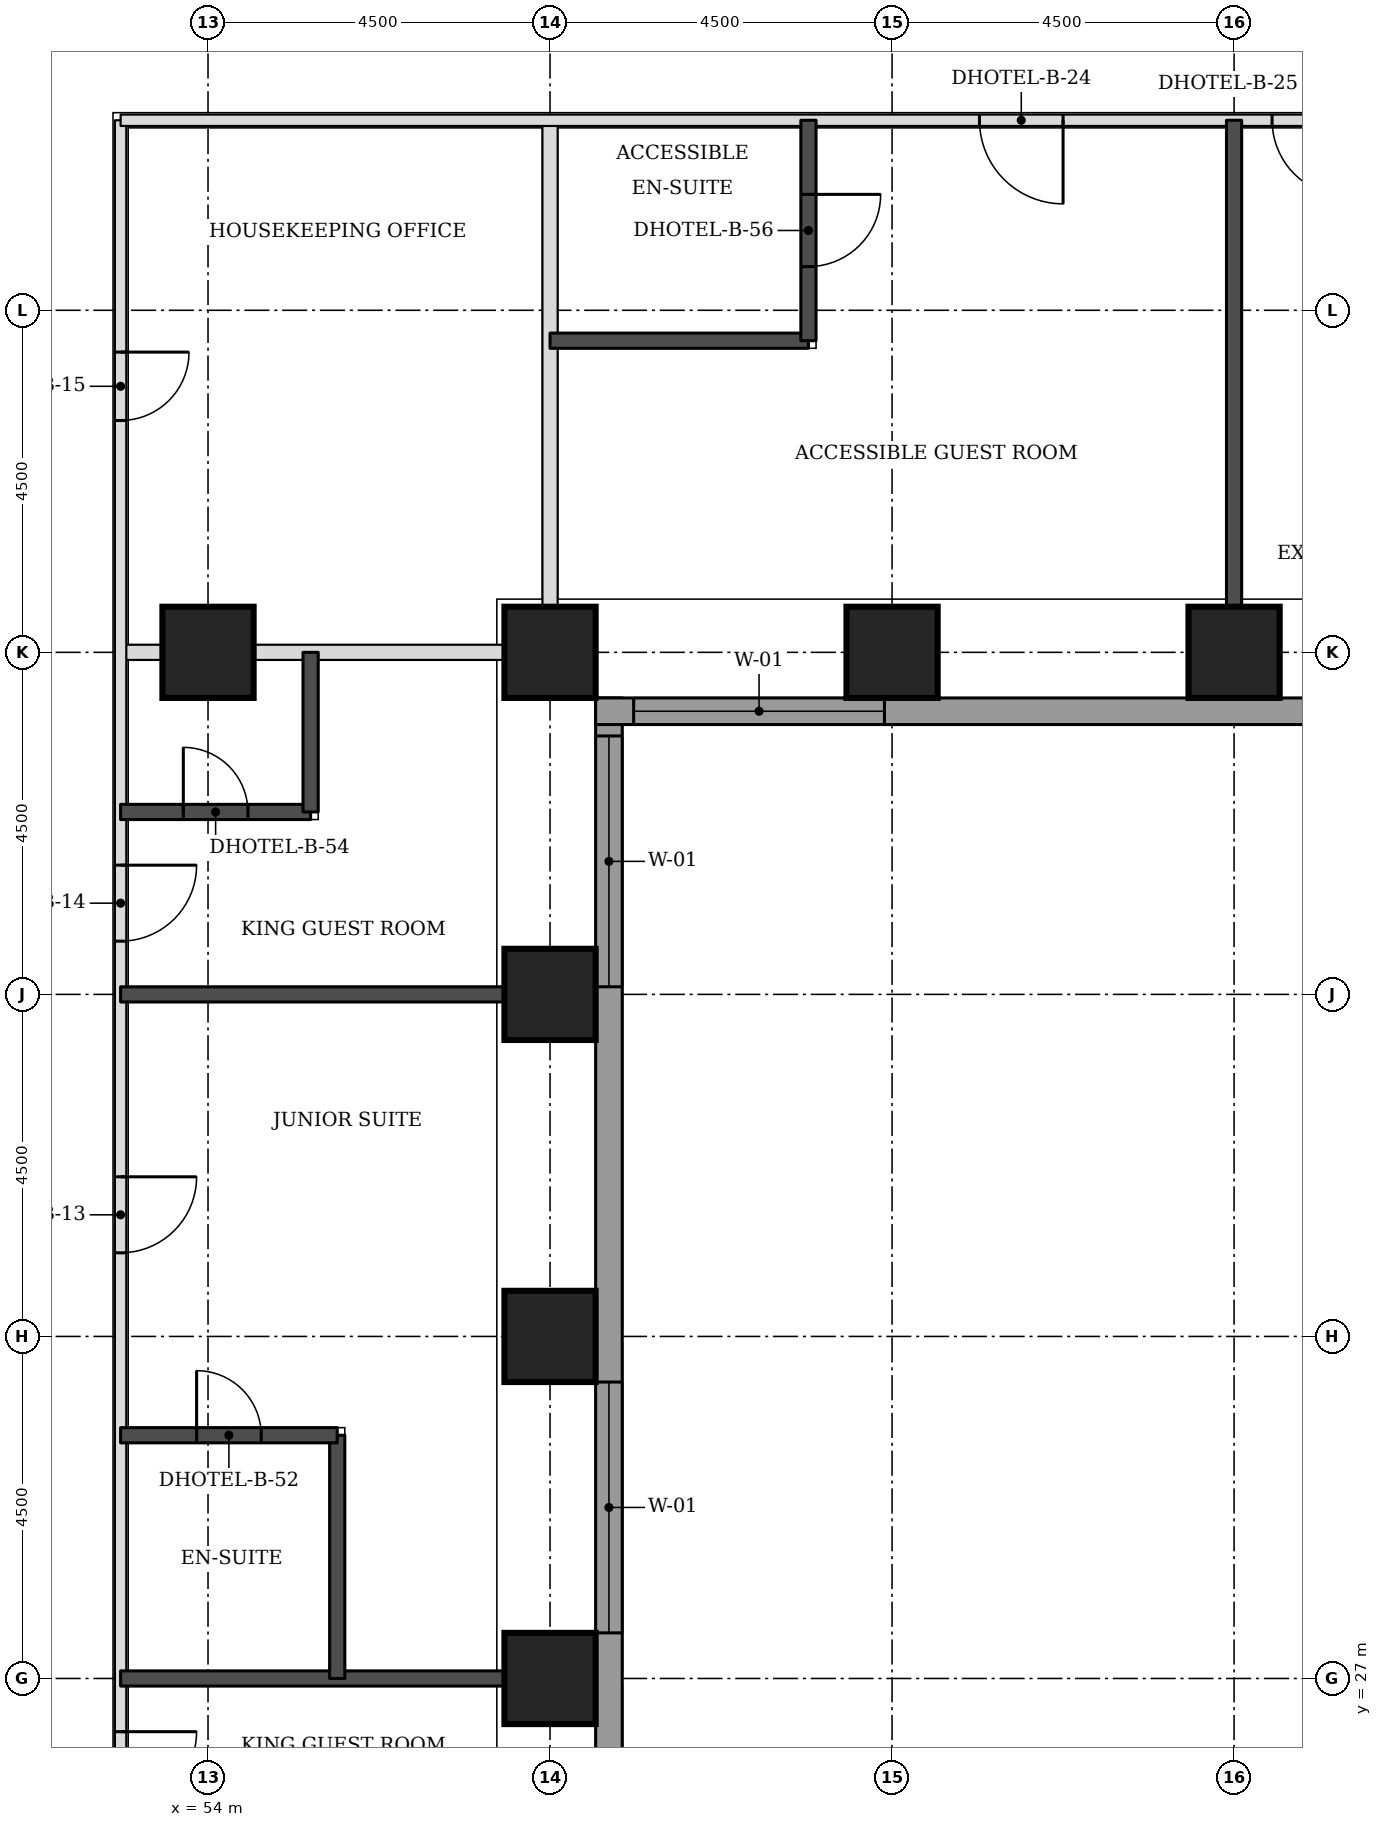
"""IFC4 building model, lengths in metres.
Left out: names, types, materials, properties, quantities, classifications, styles, units other than length and angle.
Written with IfcOpenShell. Run it as: python <this file> out.ifc"""

import sys

from ifc_helpers import new_model, si_unit, direction, frame, frame_2d, origin, origin_2d, place, context, subcontext, project, spatial, rectangle, extrude, element, fill, save


model = new_model("IFC4")
c1 = context("Model", 3, precision=1e-05, world=origin(), true_north=direction((0.0, 1.0)))
c2 = subcontext(c1, "Body", "Model", "MODEL_VIEW")
j1 = project(units=[si_unit("LENGTHUNIT", "METRE"), si_unit("PLANEANGLEUNIT", "RADIAN")], contexts=[c1])
p1 = place(None, origin())
s1 = spatial("IfcSite", under=j1, at=p1, CompositionType="ELEMENT")
p2 = place(p1, origin())
s2 = spatial("IfcBuilding", under=s1, at=p2, CompositionType="ELEMENT")
p3 = place(p2, frame((0.0, 0.0, 52.8)))
s3 = spatial("IfcBuildingStorey", under=s2, at=p3, CompositionType="ELEMENT", Elevation=52.8)
for number, where, z_axis, x_axis in (
    (1, (58.5, 27.0, 0.0), (0.0, 0.0, 1.0), (1.0, 0.0, 0.0)),
    (2, (58.5, 31.5, 0.0), (0.0, 0.0, 1.0), (1.0, 0.0, 0.0)),
    (3, (58.5, 36.0, 0.0), (0.0, 0.0, 1.0), (1.0, 0.0, 0.0)),
    (4, (54.0, 40.5, 0.0), (0.0, 0.0, 1.0), (1.0, 0.0, 0.0)),
    (5, (58.5, 40.5, 0.0), (0.0, 0.0, 1.0), (1.0, 0.0, 0.0)),
    (6, (63.0, 40.5, 0.0), (0.0, 0.0, 1.0), (1.0, 0.0, 0.0)),
    (7, (67.5, 40.5, 0.0), (0.0, 0.0, 1.0), (1.0, 0.0, 0.0)),
):
    element("IfcColumn", number, at=place(p3, frame(where, z_axis=z_axis, x_axis=x_axis)), inside=s3, PredefinedType="COLUMN", context=c2, shape_type="SweptSolid", body=[
        extrude(rectangle(XDim=1.2, YDim=1.2, at=origin_2d()), origin(), (0.0, 0.0, 1.0), 3.3),
    ])
p4 = place(p3, frame((59.275, 22.106, 0.0), z_axis=(0.0, 0.0, 1.0), x_axis=(0.0, 1.0, 0.0)))
e8 = element("IfcWall", 8, at=p4, inside=s3, PredefinedType="STANDARD", context=c2, shape_type="SweptSolid", body=[
    extrude(rectangle(XDim=17.793, YDim=0.35, at=frame_2d((8.897, 0.0))), origin(), (0.0, 0.0, 1.0), 3.055),
])
p5 = place(p4, frame((5.493, 0.0, 0.8)))
e9 = element("IfcOpeningElement", 9, at=p5, cuts=e8, PredefinedType="OPENING", context=c2, shape_type="SweptSolid", body=[
    extrude(rectangle(XDim=3.3, YDim=1.5, at=frame_2d((1.65, 0.75))), frame((0.0, 0.185, 0.0), z_axis=(0.0, -1.0, 0.0), x_axis=(1.0, 0.0, 0.0)), (0.0, 0.0, 1.0), 0.37),
])
p6 = place(p4, frame((13.993, 0.0, 0.8)))
e10 = element("IfcOpeningElement", 10, at=p6, cuts=e8, PredefinedType="OPENING", context=c2, shape_type="SweptSolid", body=[
    extrude(rectangle(XDim=3.3, YDim=1.5, at=frame_2d((1.65, 0.75))), frame((0.0, 0.185, 0.0), z_axis=(0.0, -1.0, 0.0), x_axis=(1.0, 0.0, 0.0)), (0.0, 0.0, 1.0), 0.37),
])
p7 = place(p3, frame((59.1, 39.725, 0.0), z_axis=(0.0, 0.0, 1.0), x_axis=(1.0, 0.0, 0.0)))
e11 = element("IfcWall", 11, at=p7, inside=s3, PredefinedType="STANDARD", context=c2, shape_type="SweptSolid", body=[
    extrude(rectangle(XDim=13.293, YDim=0.35, at=frame_2d((6.647, 0.0))), origin(), (0.0, 0.0, 1.0), 3.055),
])
p8 = place(p7, frame((0.5, 0.0, 0.8)))
e12 = element("IfcOpeningElement", 12, at=p8, cuts=e11, PredefinedType="OPENING", context=c2, shape_type="SweptSolid", body=[
    extrude(rectangle(XDim=3.3, YDim=1.5, at=frame_2d((1.65, 0.75))), frame((0.0, 0.185, 0.0), z_axis=(0.0, -1.0, 0.0), x_axis=(1.0, 0.0, 0.0)), (0.0, 0.0, 1.0), 0.37),
])
p9 = place(p3, frame((52.85, 40.5, 0.0), z_axis=(0.0, 0.0, 1.0), x_axis=(1.0, 0.0, 0.0)))
e13 = element("IfcWall", 13, at=p9, inside=s3, PredefinedType="PARTITIONING", context=c2, shape_type="SweptSolid", body=[
    extrude(rectangle(XDim=5.05, YDim=0.2, at=frame_2d((2.525, 0.0))), origin(), (0.0, 0.0, 1.0), 2.33),
])
p10 = place(p3, frame((58.5, 41.1, 0.0), z_axis=(0.0, 0.0, 1.0), x_axis=(0.0, 1.0, 0.0)))
e14 = element("IfcWall", 14, at=p10, inside=s3, PredefinedType="PARTITIONING", context=c2, shape_type="SweptSolid", body=[
    extrude(rectangle(XDim=6.4, YDim=0.2, at=frame_2d((3.2, 0.0))), origin(), (0.0, 0.0, 1.0), 3.08),
])
p11 = place(p3, frame((52.85, 23.65, 0.0), z_axis=(0.0, 0.0, 1.0), x_axis=(0.0, 1.0, 0.0)))
e15 = element("IfcWall", 15, at=p11, inside=s3, PredefinedType="PARTITIONING", context=c2, shape_type="SweptSolid", body=[
    extrude(rectangle(XDim=23.85, YDim=0.15, at=frame_2d((11.925, 0.0))), origin(), (0.0, 0.0, 1.0), 3.08),
])
p12 = place(p11, frame((1.65, 0.0, 0.0)))
e16 = element("IfcOpeningElement", 16, at=p12, cuts=e15, PredefinedType="OPENING", context=c2, shape_type="SweptSolid", body=[
    extrude(rectangle(XDim=1.0, YDim=2.1, at=frame_2d((0.5, 1.05))), frame((0.0, 0.085, 0.0), z_axis=(0.0, -1.0, 0.0), x_axis=(1.0, 0.0, 0.0)), (0.0, 0.0, 1.0), 0.17),
])
p13 = place(p11, frame((8.95, 0.0, 0.0)))
e17 = element("IfcOpeningElement", 17, at=p13, cuts=e15, PredefinedType="OPENING", context=c2, shape_type="SweptSolid", body=[
    extrude(rectangle(XDim=1.0, YDim=2.1, at=frame_2d((0.5, 1.05))), frame((0.0, 0.085, 0.0), z_axis=(0.0, -1.0, 0.0), x_axis=(1.0, 0.0, 0.0)), (0.0, 0.0, 1.0), 0.17),
])
p14 = place(p11, frame((13.05, 0.0, 0.0)))
e18 = element("IfcOpeningElement", 18, at=p14, cuts=e15, PredefinedType="OPENING", context=c2, shape_type="SweptSolid", body=[
    extrude(rectangle(XDim=1.0, YDim=2.1, at=frame_2d((0.5, 1.05))), frame((0.0, 0.085, 0.0), z_axis=(0.0, -1.0, 0.0), x_axis=(1.0, 0.0, 0.0)), (0.0, 0.0, 1.0), 0.17),
])
p15 = place(p11, frame((19.9, 0.0, 0.0)))
e19 = element("IfcOpeningElement", 19, at=p15, cuts=e15, PredefinedType="OPENING", context=c2, shape_type="SweptSolid", body=[
    extrude(rectangle(XDim=0.9, YDim=2.1, at=frame_2d((0.45, 1.05))), frame((0.0, 0.085, 0.0), z_axis=(0.0, -1.0, 0.0), x_axis=(1.0, 0.0, 0.0)), (0.0, 0.0, 1.0), 0.17),
])
p16 = place(p3, frame((52.85, 47.5, 0.0), z_axis=(0.0, 0.0, 1.0), x_axis=(1.0, 0.0, 0.0)))
e20 = element("IfcWall", 20, at=p16, inside=s3, PredefinedType="PARTITIONING", context=c2, shape_type="SweptSolid", body=[
    extrude(rectangle(XDim=16.65, YDim=0.15, at=frame_2d((8.325, 0.0))), origin(), (0.0, 0.0, 1.0), 3.08),
])
p17 = place(p16, frame((11.3, 0.0, 0.0)))
e21 = element("IfcOpeningElement", 21, at=p17, cuts=e20, PredefinedType="OPENING", context=c2, shape_type="SweptSolid", body=[
    extrude(rectangle(XDim=1.1, YDim=2.1, at=frame_2d((0.55, 1.05))), frame((0.0, 0.085, 0.0), z_axis=(0.0, -1.0, 0.0), x_axis=(1.0, 0.0, 0.0)), (0.0, 0.0, 1.0), 0.17),
])
p18 = place(p16, frame((15.15, 0.0, 0.0)))
e22 = element("IfcOpeningElement", 22, at=p18, cuts=e20, PredefinedType="OPENING", context=c2, shape_type="SweptSolid", body=[
    extrude(rectangle(XDim=1.0, YDim=2.1, at=frame_2d((0.5, 1.05))), frame((0.0, 0.085, 0.0), z_axis=(0.0, -1.0, 0.0), x_axis=(1.0, 0.0, 0.0)), (0.0, 0.0, 1.0), 0.17),
])
p19 = place(p3, frame((52.85, 27.0, 0.0), z_axis=(0.0, 0.0, 1.0), x_axis=(1.0, 0.0, 0.0)))
e23 = element("IfcWall", 23, at=p19, inside=s3, PredefinedType="SOLIDWALL", context=c2, shape_type="SweptSolid", body=[
    extrude(rectangle(XDim=5.05, YDim=0.2, at=frame_2d((2.525, 0.0))), origin(), (0.0, 0.0, 1.0), 3.08),
])
p20 = place(p3, frame((55.7, 27.0, 0.0), z_axis=(0.0, 0.0, 1.0), x_axis=(0.0, 1.0, 0.0)))
e24 = element("IfcWall", 24, at=p20, inside=s3, PredefinedType="SOLIDWALL", context=c2, shape_type="SweptSolid", body=[
    extrude(rectangle(XDim=3.2, YDim=0.2, at=frame_2d((1.6, 0.0))), origin(), (0.0, 0.0, 1.0), 3.08),
])
p21 = place(p3, frame((52.85, 30.2, 0.0), z_axis=(0.0, 0.0, 1.0), x_axis=(1.0, 0.0, 0.0)))
e25 = element("IfcWall", 25, at=p21, inside=s3, PredefinedType="SOLIDWALL", context=c2, shape_type="SweptSolid", body=[
    extrude(rectangle(XDim=2.85, YDim=0.2, at=frame_2d((1.425, 0.0))), origin(), (0.0, 0.0, 1.0), 3.08),
])
p22 = place(p21, frame((1.0, 0.0, 0.0)))
e26 = element("IfcOpeningElement", 26, at=p22, cuts=e25, PredefinedType="OPENING", context=c2, shape_type="SweptSolid", body=[
    extrude(rectangle(XDim=0.85, YDim=2.1, at=frame_2d((0.425, 1.05))), frame((0.0, 0.11, 0.0), z_axis=(0.0, -1.0, 0.0), x_axis=(1.0, 0.0, 0.0)), (0.0, 0.0, 1.0), 0.22),
])
p23 = place(p3, frame((52.85, 36.0, 0.0), z_axis=(0.0, 0.0, 1.0), x_axis=(1.0, 0.0, 0.0)))
e27 = element("IfcWall", 27, at=p23, inside=s3, PredefinedType="SOLIDWALL", context=c2, shape_type="SweptSolid", body=[
    extrude(rectangle(XDim=5.05, YDim=0.2, at=frame_2d((2.525, 0.0))), origin(), (0.0, 0.0, 1.0), 3.08),
])
p24 = place(p3, frame((52.85, 38.4, 0.0), z_axis=(0.0, 0.0, 1.0), x_axis=(1.0, 0.0, 0.0)))
e28 = element("IfcWall", 28, at=p24, inside=s3, PredefinedType="SOLIDWALL", context=c2, shape_type="SweptSolid", body=[
    extrude(rectangle(XDim=2.5, YDim=0.2, at=frame_2d((1.25, 0.0))), origin(), (0.0, 0.0, 1.0), 3.08),
])
p25 = place(p24, frame((0.825, 0.0, 0.0)))
e29 = element("IfcOpeningElement", 29, at=p25, cuts=e28, PredefinedType="OPENING", context=c2, shape_type="SweptSolid", body=[
    extrude(rectangle(XDim=0.85, YDim=2.1, at=frame_2d((0.425, 1.05))), frame((0.0, 0.11, 0.0), z_axis=(0.0, -1.0, 0.0), x_axis=(1.0, 0.0, 0.0)), (0.0, 0.0, 1.0), 0.22),
])
p26 = place(p3, frame((55.35, 38.4, 0.0), z_axis=(0.0, 0.0, 1.0), x_axis=(0.0, 1.0, 0.0)))
e30 = element("IfcWall", 30, at=p26, inside=s3, PredefinedType="SOLIDWALL", context=c2, shape_type="SweptSolid", body=[
    extrude(rectangle(XDim=2.1, YDim=0.2, at=frame_2d((1.05, 0.0))), origin(), (0.0, 0.0, 1.0), 3.08),
])
p27 = place(p3, frame((67.5, 41.1, 0.0), z_axis=(0.0, 0.0, 1.0), x_axis=(0.0, 1.0, 0.0)))
e31 = element("IfcWall", 31, at=p27, inside=s3, PredefinedType="SOLIDWALL", context=c2, shape_type="SweptSolid", body=[
    extrude(rectangle(XDim=6.4, YDim=0.2, at=frame_2d((3.2, 0.0))), origin(), (0.0, 0.0, 1.0), 3.08),
])
p28 = place(p3, frame((58.5, 44.6, 0.0), z_axis=(0.0, 0.0, 1.0), x_axis=(1.0, 0.0, 0.0)))
e32 = element("IfcWall", 32, at=p28, inside=s3, PredefinedType="SOLIDWALL", context=c2, shape_type="SweptSolid", body=[
    extrude(rectangle(XDim=3.4, YDim=0.2, at=frame_2d((1.7, 0.0))), origin(), (0.0, 0.0, 1.0), 3.08),
])
p29 = place(p3, frame((61.9, 44.6, 0.0), z_axis=(0.0, 0.0, 1.0), x_axis=(0.0, 1.0, 0.0)))
e33 = element("IfcWall", 33, at=p29, inside=s3, PredefinedType="SOLIDWALL", context=c2, shape_type="SweptSolid", body=[
    extrude(rectangle(XDim=2.9, YDim=0.2, at=frame_2d((1.45, 0.0))), origin(), (0.0, 0.0, 1.0), 3.08),
])
p30 = place(p29, frame((0.975, 0.0, 0.0)))
e34 = element("IfcOpeningElement", 34, at=p30, cuts=e33, PredefinedType="OPENING", context=c2, shape_type="SweptSolid", body=[
    extrude(rectangle(XDim=0.95, YDim=2.1, at=frame_2d((0.475, 1.05))), frame((0.0, 0.11, 0.0), z_axis=(0.0, -1.0, 0.0), x_axis=(1.0, 0.0, 0.0)), (0.0, 0.0, 1.0), 0.22),
])
p31 = place(p5, origin())
e35 = element("IfcWindow", 35, at=p31, inside=s3, PartitioningType="SINGLE_PANEL", PredefinedType="WINDOW", context=c2, shape_type="SweptSolid", body=[
    extrude(rectangle(XDim=3.3, YDim=1.5, at=frame_2d((1.65, 0.75))), frame((0.0, 0.085, 0.0), z_axis=(0.0, -1.0, 0.0), x_axis=(1.0, 0.0, 0.0)), (0.0, 0.0, 1.0), 0.06),
])
fill(e9, e35)
p32 = place(p6, origin())
e36 = element("IfcWindow", 36, at=p32, inside=s3, PartitioningType="SINGLE_PANEL", PredefinedType="WINDOW", context=c2, shape_type="SweptSolid", body=[
    extrude(rectangle(XDim=3.3, YDim=1.5, at=frame_2d((1.65, 0.75))), frame((0.0, 0.085, 0.0), z_axis=(0.0, -1.0, 0.0), x_axis=(1.0, 0.0, 0.0)), (0.0, 0.0, 1.0), 0.06),
])
fill(e10, e36)
p33 = place(p8, origin())
e37 = element("IfcWindow", 37, at=p33, inside=s3, PartitioningType="SINGLE_PANEL", PredefinedType="WINDOW", context=c2, shape_type="SweptSolid", body=[
    extrude(rectangle(XDim=3.3, YDim=1.5, at=frame_2d((1.65, 0.75))), frame((0.0, 0.085, 0.0), z_axis=(0.0, -1.0, 0.0), x_axis=(1.0, 0.0, 0.0)), (0.0, 0.0, 1.0), 0.06),
])
fill(e12, e37)
p34 = place(p12, frame((1.0, 0.0, 0.0), z_axis=(0.0, 0.0, 1.0), x_axis=(-1.0, 0.0, 0.0)))
e38 = element("IfcDoor", 38, at=p34, inside=s3, OperationType="SINGLE_SWING_LEFT", PredefinedType="DOOR", context=c2, shape_type="SweptSolid", body=[
    extrude(rectangle(XDim=1.0, YDim=2.1, at=frame_2d((0.5, 1.05))), frame((0.0, 0.025, 0.0), z_axis=(0.0, -1.0, 0.0), x_axis=(1.0, 0.0, 0.0)), (0.0, 0.0, 1.0), 0.05),
])
fill(e16, e38)
p35 = place(p13, frame((1.0, 0.0, 0.0), z_axis=(0.0, 0.0, 1.0), x_axis=(-1.0, 0.0, 0.0)))
e39 = element("IfcDoor", 39, at=p35, inside=s3, OperationType="SINGLE_SWING_LEFT", PredefinedType="DOOR", context=c2, shape_type="SweptSolid", body=[
    extrude(rectangle(XDim=1.0, YDim=2.1, at=frame_2d((0.5, 1.05))), frame((0.0, 0.025, 0.0), z_axis=(0.0, -1.0, 0.0), x_axis=(1.0, 0.0, 0.0)), (0.0, 0.0, 1.0), 0.05),
])
fill(e17, e39)
p36 = place(p22, origin())
e40 = element("IfcDoor", 40, at=p36, inside=s3, OperationType="SINGLE_SWING_LEFT", PredefinedType="DOOR", context=c2, shape_type="SweptSolid", body=[
    extrude(rectangle(XDim=0.85, YDim=2.1, at=frame_2d((0.425, 1.05))), frame((0.0, 0.025, 0.0), z_axis=(0.0, -1.0, 0.0), x_axis=(1.0, 0.0, 0.0)), (0.0, 0.0, 1.0), 0.05),
])
fill(e26, e40)
p37 = place(p14, frame((1.0, 0.0, 0.0), z_axis=(0.0, 0.0, 1.0), x_axis=(-1.0, 0.0, 0.0)))
e41 = element("IfcDoor", 41, at=p37, inside=s3, OperationType="SINGLE_SWING_LEFT", PredefinedType="DOOR", context=c2, shape_type="SweptSolid", body=[
    extrude(rectangle(XDim=1.0, YDim=2.1, at=frame_2d((0.5, 1.05))), frame((0.0, 0.025, 0.0), z_axis=(0.0, -1.0, 0.0), x_axis=(1.0, 0.0, 0.0)), (0.0, 0.0, 1.0), 0.05),
])
fill(e18, e41)
p38 = place(p25, origin())
e42 = element("IfcDoor", 42, at=p38, inside=s3, OperationType="SINGLE_SWING_LEFT", PredefinedType="DOOR", context=c2, shape_type="SweptSolid", body=[
    extrude(rectangle(XDim=0.85, YDim=2.1, at=frame_2d((0.425, 1.05))), frame((0.0, 0.025, 0.0), z_axis=(0.0, -1.0, 0.0), x_axis=(1.0, 0.0, 0.0)), (0.0, 0.0, 1.0), 0.05),
])
fill(e29, e42)
p39 = place(p17, frame((1.1, 0.0, 0.0), z_axis=(0.0, 0.0, 1.0), x_axis=(-1.0, 0.0, 0.0)))
e43 = element("IfcDoor", 43, at=p39, inside=s3, OperationType="SINGLE_SWING_LEFT", PredefinedType="DOOR", context=c2, shape_type="SweptSolid", body=[
    extrude(rectangle(XDim=1.1, YDim=2.1, at=frame_2d((0.55, 1.05))), frame((0.0, 0.025, 0.0), z_axis=(0.0, -1.0, 0.0), x_axis=(1.0, 0.0, 0.0)), (0.0, 0.0, 1.0), 0.05),
])
fill(e21, e43)
p40 = place(p30, frame((0.95, 0.0, 0.0), z_axis=(0.0, 0.0, 1.0), x_axis=(-1.0, 0.0, 0.0)))
e44 = element("IfcDoor", 44, at=p40, inside=s3, OperationType="SINGLE_SWING_LEFT", PredefinedType="DOOR", context=c2, shape_type="SweptSolid", body=[
    extrude(rectangle(XDim=0.95, YDim=2.1, at=frame_2d((0.475, 1.05))), frame((0.0, 0.025, 0.0), z_axis=(0.0, -1.0, 0.0), x_axis=(1.0, 0.0, 0.0)), (0.0, 0.0, 1.0), 0.05),
])
fill(e34, e44)
p41 = place(p18, frame((1.0, 0.0, 0.0), z_axis=(0.0, 0.0, 1.0), x_axis=(-1.0, 0.0, 0.0)))
e45 = element("IfcDoor", 45, at=p41, inside=s3, OperationType="SINGLE_SWING_LEFT", PredefinedType="DOOR", context=c2, shape_type="SweptSolid", body=[
    extrude(rectangle(XDim=1.0, YDim=2.1, at=frame_2d((0.5, 1.05))), frame((0.0, 0.025, 0.0), z_axis=(0.0, -1.0, 0.0), x_axis=(1.0, 0.0, 0.0)), (0.0, 0.0, 1.0), 0.05),
])
fill(e22, e45)
p42 = place(p15, frame((0.9, 0.0, 0.0), z_axis=(0.0, 0.0, 1.0), x_axis=(-1.0, 0.0, 0.0)))
e46 = element("IfcDoor", 46, at=p42, inside=s3, OperationType="SINGLE_SWING_LEFT", PredefinedType="DOOR", context=c2, shape_type="SweptSolid", body=[
    extrude(rectangle(XDim=0.9, YDim=2.1, at=frame_2d((0.45, 1.05))), frame((0.0, 0.025, 0.0), z_axis=(0.0, -1.0, 0.0), x_axis=(1.0, 0.0, 0.0)), (0.0, 0.0, 1.0), 0.05),
])
fill(e19, e46)
save(model, sys.argv[1])
